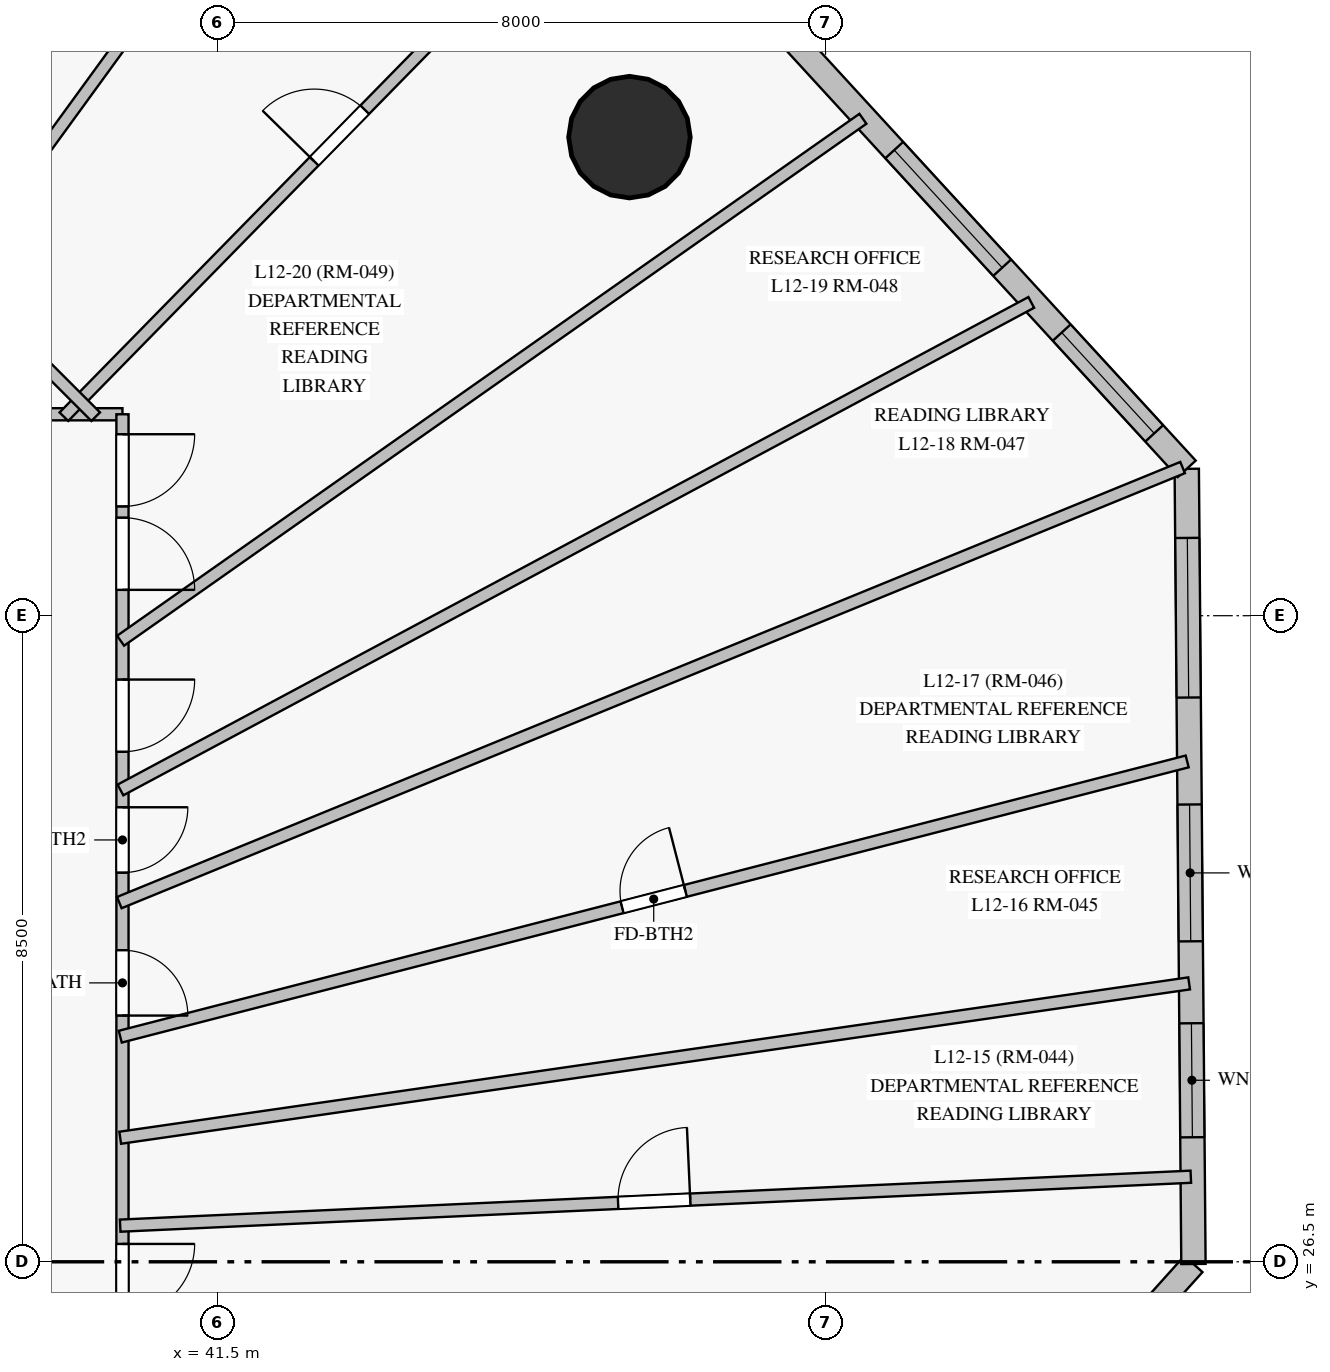
"""IFC4 building model, lengths in metres.
Left out: names, types, materials, properties, quantities, classifications, styles, units other than length and angle.
Written with IfcOpenShell. Run it as: python <this file> out.ifc"""

import sys

from ifc_helpers import new_model, si_unit, direction, frame, frame_2d, origin, origin_with_axes, origin_2d, place, context, subcontext, project, spatial, rectangle, circle, extrude, source, transform, mapped, element, fill, save


model = new_model("IFC4")
c1 = context("Model", 3, precision=1e-05, world=origin(), true_north=direction((0.0, 1.0)))
c2 = subcontext(c1, "Body", "Model", "MODEL_VIEW")
j1 = project(units=[si_unit("LENGTHUNIT", "METRE"), si_unit("PLANEANGLEUNIT", "RADIAN")], contexts=[c1])
p1 = place(None, origin())
s1 = spatial("IfcSite", under=j1, at=p1, CompositionType="ELEMENT")
p2 = place(p1, origin())
s2 = spatial("IfcBuilding", under=s1, at=p2, CompositionType="ELEMENT")
p3 = place(p2, frame((0.0, 0.0, 48.1)))
s3 = spatial("IfcBuildingStorey", under=s2, at=p3, CompositionType="ELEMENT", Elevation=48.1)
m1 = source(origin_with_axes(), c2, "Body", "SweptSolid", [
    extrude(circle(Radius=0.8, at=origin_2d()), origin(), (0.0, 0.0, 1.0), 3.6),
])
p4 = place(p3, frame((46.92, 41.296, 0.0), z_axis=(0.0, 0.0, 1.0), x_axis=(1.0, 0.0, 0.0)))
e1 = element("IfcColumn", 1, at=p4, inside=s3, PredefinedType="COLUMN", context=c2, shape_type="MappedRepresentation", body=[
    mapped(m1, transform((0.0, 0.0, 0.0), scale=1.0)),
])
p5 = place(p3, frame((43.846, 14.796, 0.0), z_axis=(0.0, 0.0, 1.0), x_axis=(0.668485145509, 0.743725493871, 0.0)))
e2 = element("IfcWall", 2, at=p5, inside=s3, PredefinedType="SOLIDWALL", context=c2, shape_type="SweptSolid", body=[
    extrude(rectangle(XDim=15.698, YDim=0.32, at=frame_2d((7.849, 0.0))), origin(), (0.0, 0.0, 1.0), 3.35),
])
p6 = place(p5, frame((2.419, 0.0, 0.85)))
e3 = element("IfcOpeningElement", 3, at=p6, cuts=e2, PredefinedType="OPENING", context=c2, shape_type="SweptSolid", body=[
    extrude(rectangle(XDim=2.1, YDim=1.95, at=frame_2d((1.05, 0.975))), frame((0.0, 0.17, 0.0), z_axis=(0.0, -1.0, 0.0), x_axis=(1.0, 0.0, 0.0)), (0.0, 0.0, 1.0), 0.34),
])
p7 = place(p5, frame((7.36, 0.0, 0.85)))
e4 = element("IfcOpeningElement", 4, at=p7, cuts=e2, PredefinedType="OPENING", context=c2, shape_type="SweptSolid", body=[
    extrude(rectangle(XDim=2.1, YDim=1.95, at=frame_2d((1.05, 0.975))), frame((0.0, 0.17, 0.0), z_axis=(0.0, -1.0, 0.0), x_axis=(1.0, 0.0, 0.0)), (0.0, 0.0, 1.0), 0.34),
])
p8 = place(p5, frame((12.369, 0.0, 0.85)))
e5 = element("IfcOpeningElement", 5, at=p8, cuts=e2, PredefinedType="OPENING", context=c2, shape_type="SweptSolid", body=[
    extrude(rectangle(XDim=2.1, YDim=1.95, at=frame_2d((1.05, 0.975))), frame((0.0, 0.17, 0.0), z_axis=(0.0, -1.0, 0.0), x_axis=(1.0, 0.0, 0.0)), (0.0, 0.0, 1.0), 0.34),
])
p9 = place(p3, frame((54.34, 26.471, 0.0), z_axis=(0.0, 0.0, 1.0), x_axis=(-0.008424635088, 0.999964512132, 0.0)))
e6 = element("IfcWall", 6, at=p9, inside=s3, PredefinedType="SOLIDWALL", context=c2, shape_type="SweptSolid", body=[
    extrude(rectangle(XDim=10.462, YDim=0.32, at=frame_2d((5.231, 0.0))), origin(), (0.0, 0.0, 1.0), 3.35),
])
p10 = place(p9, frame((1.667, 0.0, 0.85)))
e7 = element("IfcOpeningElement", 7, at=p10, cuts=e6, PredefinedType="OPENING", context=c2, shape_type="SweptSolid", body=[
    extrude(rectangle(XDim=1.5, YDim=1.85, at=frame_2d((0.75, 0.925))), frame((0.0, 0.17, 0.0), z_axis=(0.0, -1.0, 0.0), x_axis=(1.0, 0.0, 0.0)), (0.0, 0.0, 1.0), 0.34),
])
p11 = place(p9, frame((4.245, 0.0, 0.85)))
e8 = element("IfcOpeningElement", 8, at=p11, cuts=e6, PredefinedType="OPENING", context=c2, shape_type="SweptSolid", body=[
    extrude(rectangle(XDim=1.8, YDim=1.85, at=frame_2d((0.9, 0.925))), frame((0.0, 0.17, 0.0), z_axis=(0.0, -1.0, 0.0), x_axis=(1.0, 0.0, 0.0)), (0.0, 0.0, 1.0), 0.34),
])
p12 = place(p9, frame((7.452, 0.0, 0.85)))
e9 = element("IfcOpeningElement", 9, at=p12, cuts=e6, PredefinedType="OPENING", context=c2, shape_type="SweptSolid", body=[
    extrude(rectangle(XDim=2.1, YDim=1.95, at=frame_2d((1.05, 0.975))), frame((0.0, 0.17, 0.0), z_axis=(0.0, -1.0, 0.0), x_axis=(1.0, 0.0, 0.0)), (0.0, 0.0, 1.0), 0.34),
])
p13 = place(p3, frame((54.252, 36.932, 0.0), z_axis=(0.0, 0.0, 1.0), x_axis=(-0.676154884731, 0.736759507474, 0.0)))
e10 = element("IfcWall", 10, at=p13, inside=s3, PredefinedType="SOLIDWALL", context=c2, shape_type="SweptSolid", body=[
    extrude(rectangle(XDim=13.024, YDim=0.32, at=frame_2d((6.512, 0.0))), origin(), (0.0, 0.0, 1.0), 3.35),
])
p14 = place(p13, frame((0.633, 0.0, 0.85)))
e11 = element("IfcOpeningElement", 11, at=p14, cuts=e10, PredefinedType="OPENING", context=c2, shape_type="SweptSolid", body=[
    extrude(rectangle(XDim=1.8, YDim=1.85, at=frame_2d((0.9, 0.925))), frame((0.0, 0.17, 0.0), z_axis=(0.0, -1.0, 0.0), x_axis=(1.0, 0.0, 0.0)), (0.0, 0.0, 1.0), 0.34),
])
p15 = place(p13, frame((3.592, 0.0, 0.85)))
e12 = element("IfcOpeningElement", 12, at=p15, cuts=e10, PredefinedType="OPENING", context=c2, shape_type="SweptSolid", body=[
    extrude(rectangle(XDim=2.1, YDim=1.95, at=frame_2d((1.05, 0.975))), frame((0.0, 0.17, 0.0), z_axis=(0.0, -1.0, 0.0), x_axis=(1.0, 0.0, 0.0)), (0.0, 0.0, 1.0), 0.34),
])
p16 = place(p13, frame((7.611, 0.0, 0.85)))
e13 = element("IfcOpeningElement", 13, at=p16, cuts=e10, PredefinedType="OPENING", context=c2, shape_type="SweptSolid", body=[
    extrude(rectangle(XDim=2.1, YDim=1.95, at=frame_2d((1.05, 0.975))), frame((0.0, 0.17, 0.0), z_axis=(0.0, -1.0, 0.0), x_axis=(1.0, 0.0, 0.0)), (0.0, 0.0, 1.0), 0.34),
])
p17 = place(p3, frame((10.5, 37.65, 0.0), z_axis=(0.0, 0.0, 1.0), x_axis=(1.0, 0.0, 0.0)))
e14 = element("IfcWall", 14, at=p17, inside=s3, PredefinedType="PARTITIONING", context=c2, shape_type="SweptSolid", body=[
    extrude(rectangle(XDim=29.75, YDim=0.16, at=frame_2d((14.875, 0.0))), origin(), (0.0, 0.0, 1.0), 2.75),
])
p18 = place(p17, frame((21.927, 0.0, 0.0)))
e15 = element("IfcOpeningElement", 15, at=p18, cuts=e14, PredefinedType="OPENING", context=c2, shape_type="SweptSolid", body=[
    extrude(rectangle(XDim=0.95, YDim=2.15, at=frame_2d((0.475, 1.075))), frame((0.0, 0.09, 0.0), z_axis=(0.0, -1.0, 0.0), x_axis=(1.0, 0.0, 0.0)), (0.0, 0.0, 1.0), 0.18),
])
p19 = place(p17, frame((20.262, 0.0, 0.0)))
e16 = element("IfcOpeningElement", 16, at=p19, cuts=e14, PredefinedType="OPENING", context=c2, shape_type="SweptSolid", body=[
    extrude(rectangle(XDim=0.95, YDim=2.15, at=frame_2d((0.475, 1.075))), frame((0.0, 0.09, 0.0), z_axis=(0.0, -1.0, 0.0), x_axis=(1.0, 0.0, 0.0)), (0.0, 0.0, 1.0), 0.18),
])
p20 = place(p17, frame((18.722, 0.0, 0.0)))
e17 = element("IfcOpeningElement", 17, at=p20, cuts=e14, PredefinedType="OPENING", context=c2, shape_type="SweptSolid", body=[
    extrude(rectangle(XDim=0.95, YDim=2.15, at=frame_2d((0.475, 1.075))), frame((0.0, 0.09, 0.0), z_axis=(0.0, -1.0, 0.0), x_axis=(1.0, 0.0, 0.0)), (0.0, 0.0, 1.0), 0.18),
])
p21 = place(p17, frame((14.4, 0.0, 0.0)))
e18 = element("IfcOpeningElement", 18, at=p21, cuts=e14, PredefinedType="OPENING", context=c2, shape_type="SweptSolid", body=[
    extrude(rectangle(XDim=0.95, YDim=2.15, at=frame_2d((0.475, 1.075))), frame((0.0, 0.09, 0.0), z_axis=(0.0, -1.0, 0.0), x_axis=(1.0, 0.0, 0.0)), (0.0, 0.0, 1.0), 0.18),
])
p22 = place(p17, frame((6.962, 0.0, 0.0)))
e19 = element("IfcOpeningElement", 19, at=p22, cuts=e14, PredefinedType="OPENING", context=c2, shape_type="SweptSolid", body=[
    extrude(rectangle(XDim=0.95, YDim=2.15, at=frame_2d((0.475, 1.075))), frame((0.0, 0.09, 0.0), z_axis=(0.0, -1.0, 0.0), x_axis=(1.0, 0.0, 0.0)), (0.0, 0.0, 1.0), 0.18),
])
p23 = place(p3, frame((40.25, 37.65, 0.0), z_axis=(0.0, 0.0, 1.0), x_axis=(0.0, -1.0, 0.0)))
e20 = element("IfcWall", 20, at=p23, inside=s3, PredefinedType="PARTITIONING", context=c2, shape_type="SweptSolid", body=[
    extrude(rectangle(XDim=22.3, YDim=0.16, at=frame_2d((11.15, 0.0))), origin(), (0.0, 0.0, 1.0), 2.75),
])
p24 = place(p23, frame((14.02, 0.0, 0.0)))
e21 = element("IfcOpeningElement", 21, at=p24, cuts=e20, PredefinedType="OPENING", context=c2, shape_type="SweptSolid", body=[
    extrude(rectangle(XDim=0.95, YDim=2.15, at=frame_2d((0.475, 1.075))), frame((0.0, 0.09, 0.0), z_axis=(0.0, -1.0, 0.0), x_axis=(1.0, 0.0, 0.0)), (0.0, 0.0, 1.0), 0.18),
])
p25 = place(p23, frame((10.915, 0.0, 0.0)))
e22 = element("IfcOpeningElement", 22, at=p25, cuts=e20, PredefinedType="OPENING", context=c2, shape_type="SweptSolid", body=[
    extrude(rectangle(XDim=0.95, YDim=2.15, at=frame_2d((0.475, 1.075))), frame((0.0, 0.09, 0.0), z_axis=(0.0, -1.0, 0.0), x_axis=(1.0, 0.0, 0.0)), (0.0, 0.0, 1.0), 0.18),
])
p26 = place(p23, frame((7.051, 0.0, 0.0)))
e23 = element("IfcOpeningElement", 23, at=p26, cuts=e20, PredefinedType="OPENING", context=c2, shape_type="SweptSolid", body=[
    extrude(rectangle(XDim=0.86, YDim=2.1, at=frame_2d((0.43, 1.05))), frame((0.0, 0.09, 0.0), z_axis=(0.0, -1.0, 0.0), x_axis=(1.0, 0.0, 0.0)), (0.0, 0.0, 1.0), 0.18),
])
p27 = place(p23, frame((3.49, 0.0, 0.0)))
e24 = element("IfcOpeningElement", 24, at=p27, cuts=e20, PredefinedType="OPENING", context=c2, shape_type="SweptSolid", body=[
    extrude(rectangle(XDim=0.95, YDim=2.15, at=frame_2d((0.475, 1.075))), frame((0.0, 0.09, 0.0), z_axis=(0.0, -1.0, 0.0), x_axis=(1.0, 0.0, 0.0)), (0.0, 0.0, 1.0), 0.18),
])
p28 = place(p23, frame((1.36, 0.0, 0.0)))
e25 = element("IfcOpeningElement", 25, at=p28, cuts=e20, PredefinedType="OPENING", context=c2, shape_type="SweptSolid", body=[
    extrude(rectangle(XDim=0.95, YDim=2.15, at=frame_2d((0.475, 1.075))), frame((0.0, 0.09, 0.0), z_axis=(0.0, -1.0, 0.0), x_axis=(1.0, 0.0, 0.0)), (0.0, 0.0, 1.0), 0.18),
])
p29 = place(p23, frame((0.263, 0.0, 0.0)))
e26 = element("IfcOpeningElement", 26, at=p29, cuts=e20, PredefinedType="OPENING", context=c2, shape_type="SweptSolid", body=[
    extrude(rectangle(XDim=0.95, YDim=2.15, at=frame_2d((0.475, 1.075))), frame((0.0, 0.09, 0.0), z_axis=(0.0, -1.0, 0.0), x_axis=(1.0, 0.0, 0.0)), (0.0, 0.0, 1.0), 0.18),
])
p30 = place(p23, frame((15.155, 0.0, 0.0)))
e27 = element("IfcOpeningElement", 27, at=p30, cuts=e20, PredefinedType="OPENING", context=c2, shape_type="SweptSolid", body=[
    extrude(rectangle(XDim=0.95, YDim=2.15, at=frame_2d((0.475, 1.075))), frame((0.0, 0.09, 0.0), z_axis=(0.0, -1.0, 0.0), x_axis=(1.0, 0.0, 0.0)), (0.0, 0.0, 1.0), 0.18),
])
p31 = place(p23, frame((5.17, 0.0, 0.0)))
e28 = element("IfcOpeningElement", 28, at=p31, cuts=e20, PredefinedType="OPENING", context=c2, shape_type="SweptSolid", body=[
    extrude(rectangle(XDim=0.86, YDim=2.04, at=frame_2d((0.43, 1.02))), frame((0.0, 0.09, 0.0), z_axis=(0.0, -1.0, 0.0), x_axis=(1.0, 0.0, 0.0)), (0.0, 0.0, 1.0), 0.18),
])
p32 = place(p3, frame((40.208, 31.226, 0.0), z_axis=(0.0, 0.0, 1.0), x_axis=(0.925535120156, 0.378661776995, 0.0)))
e29 = element("IfcWall", 29, at=p32, inside=s3, PredefinedType="PARTITIONING", context=c2, shape_type="SweptSolid", body=[
    extrude(rectangle(XDim=15.115, YDim=0.16, at=frame_2d((7.557, 0.0))), origin(), (0.0, 0.0, 1.0), 3.35),
])
p33 = place(p3, frame((40.221, 29.462, 0.0), z_axis=(0.0, 0.0, 1.0), x_axis=(0.968302425426, 0.249780729667, 0.0)))
e30 = element("IfcWall", 30, at=p33, inside=s3, PredefinedType="PARTITIONING", context=c2, shape_type="SweptSolid", body=[
    extrude(rectangle(XDim=14.496, YDim=0.16, at=frame_2d((7.248, 0.0))), origin(), (0.0, 0.0, 1.0), 3.35),
])
p34 = place(p33, frame((6.818, 0.0, 0.0)))
e31 = element("IfcOpeningElement", 31, at=p34, cuts=e30, PredefinedType="OPENING", context=c2, shape_type="SweptSolid", body=[
    extrude(rectangle(XDim=0.86, YDim=2.04, at=frame_2d((0.43, 1.02))), frame((0.0, 0.09, 0.0), z_axis=(0.0, -1.0, 0.0), x_axis=(1.0, 0.0, 0.0)), (0.0, 0.0, 1.0), 0.18),
])
p35 = place(p3, frame((40.22, 28.132, 0.0), z_axis=(0.0, 0.0, 1.0), x_axis=(0.989733920752, 0.142922237992, 0.0)))
e32 = element("IfcWall", 32, at=p35, inside=s3, PredefinedType="PARTITIONING", context=c2, shape_type="SweptSolid", body=[
    extrude(rectangle(XDim=14.209, YDim=0.16, at=frame_2d((7.104, 0.0))), origin(), (0.0, 0.0, 1.0), 3.35),
])
p36 = place(p3, frame((40.22, 26.976, 0.0), z_axis=(0.0, 0.0, 1.0), x_axis=(0.998957874031, 0.045641712413, 0.0)))
e33 = element("IfcWall", 33, at=p36, inside=s3, PredefinedType="PARTITIONING", context=c2, shape_type="SweptSolid", body=[
    extrude(rectangle(XDim=14.1, YDim=0.16, at=frame_2d((7.05, 0.0))), origin(), (0.0, 0.0, 1.0), 3.35),
])
p37 = place(p36, frame((6.558, 0.0, 0.0)))
e34 = element("IfcOpeningElement", 34, at=p37, cuts=e33, PredefinedType="OPENING", context=c2, shape_type="SweptSolid", body=[
    extrude(rectangle(XDim=0.95, YDim=2.15, at=frame_2d((0.475, 1.075))), frame((0.0, 0.09, 0.0), z_axis=(0.0, -1.0, 0.0), x_axis=(1.0, 0.0, 0.0)), (0.0, 0.0, 1.0), 0.18),
])
p38 = place(p3, frame((40.224, 32.708, 0.0), z_axis=(0.0, 0.0, 1.0), x_axis=(0.881639877006, 0.471922798001, 0.0)))
e35 = element("IfcWall", 35, at=p38, inside=s3, PredefinedType="PARTITIONING", context=c2, shape_type="SweptSolid", body=[
    extrude(rectangle(XDim=13.591, YDim=0.16, at=frame_2d((6.796, 0.0))), origin(), (0.0, 0.0, 1.0), 3.35),
])
p39 = place(p3, frame((40.226, 34.671, 0.0), z_axis=(0.0, 0.0, 1.0), x_axis=(0.818038780685, 0.5751630667, 0.0)))
e36 = element("IfcWall", 36, at=p39, inside=s3, PredefinedType="PARTITIONING", context=c2, shape_type="SweptSolid", body=[
    extrude(rectangle(XDim=11.938, YDim=0.16, at=frame_2d((5.969, 0.0))), origin(), (0.0, 0.0, 1.0), 3.35),
])
p40 = place(p3, frame((39.479, 37.618, 0.0), z_axis=(0.0, 0.0, 1.0), x_axis=(0.699941263182, 0.714200411716, 0.0)))
e37 = element("IfcWall", 37, at=p40, inside=s3, PredefinedType="PARTITIONING", context=c2, shape_type="SweptSolid", body=[
    extrude(rectangle(XDim=10.41, YDim=0.16, at=frame_2d((5.205, 0.0))), origin(), (0.0, 0.0, 1.0), 3.35),
])
p41 = place(p40, frame((4.705, 0.0, 0.0)))
e38 = element("IfcOpeningElement", 38, at=p41, cuts=e37, PredefinedType="OPENING", context=c2, shape_type="SweptSolid", body=[
    extrude(rectangle(XDim=0.95, YDim=2.15, at=frame_2d((0.475, 1.075))), frame((0.0, 0.09, 0.0), z_axis=(0.0, -1.0, 0.0), x_axis=(1.0, 0.0, 0.0)), (0.0, 0.0, 1.0), 0.18),
])
p42 = place(p3, frame((38.026, 39.49, 0.0), z_axis=(0.0, 0.0, 1.0), x_axis=(0.588344255405, 0.808610559622, 0.0)))
e39 = element("IfcWall", 39, at=p42, inside=s3, PredefinedType="PARTITIONING", context=c2, shape_type="SweptSolid", body=[
    extrude(rectangle(XDim=9.421, YDim=0.16, at=frame_2d((4.711, 0.0))), origin(), (0.0, 0.0, 1.0), 3.35),
])
p43 = place(p42, frame((4.281, 0.0, 0.0)))
e40 = element("IfcOpeningElement", 40, at=p43, cuts=e39, PredefinedType="OPENING", context=c2, shape_type="SweptSolid", body=[
    extrude(rectangle(XDim=0.86, YDim=2.04, at=frame_2d((0.43, 1.02))), frame((0.0, 0.09, 0.0), z_axis=(0.0, -1.0, 0.0), x_axis=(1.0, 0.0, 0.0)), (0.0, 0.0, 1.0), 0.18),
])
p44 = place(p3, frame((39.898, 37.618, 0.0), z_axis=(0.0, 0.0, 1.0), x_axis=(-0.707106781187, 0.707106781187, 0.0)))
e41 = element("IfcWall", 41, at=p44, inside=s3, PredefinedType="PARTITIONING", context=c2, shape_type="SweptSolid", body=[
    extrude(rectangle(XDim=2.647, YDim=0.16, at=frame_2d((1.324, 0.0))), origin(), (0.0, 0.0, 1.0), 2.75),
])
m2 = source(origin_with_axes(), c2, "Body", "SweptSolid", [
    extrude(rectangle(XDim=1.5, YDim=1.85, at=frame_2d((0.75, 0.925))), frame((0.0, 0.03, 0.0), z_axis=(0.0, -1.0, 0.0), x_axis=(1.0, 0.0, 0.0)), (0.0, 0.0, 1.0), 0.06),
])
p45 = place(p10, origin())
e42 = element("IfcWindow", 42, at=p45, inside=s3, PartitioningType="SINGLE_PANEL", PredefinedType="WINDOW", context=c2, shape_type="MappedRepresentation", body=[
    mapped(m2, transform((0.0, 0.0, 0.0), scale=1.0)),
])
fill(e7, e42)
m3 = source(origin_with_axes(), c2, "Body", "SweptSolid", [
    extrude(rectangle(XDim=1.8, YDim=1.85, at=frame_2d((0.9, 0.925))), frame((0.0, 0.03, 0.0), z_axis=(0.0, -1.0, 0.0), x_axis=(1.0, 0.0, 0.0)), (0.0, 0.0, 1.0), 0.06),
])
p46 = place(p11, origin())
e43 = element("IfcWindow", 43, at=p46, inside=s3, PartitioningType="SINGLE_PANEL", PredefinedType="WINDOW", context=c2, shape_type="MappedRepresentation", body=[
    mapped(m3, transform((0.0, 0.0, 0.0), scale=1.0)),
])
fill(e8, e43)
m4 = source(origin_with_axes(), c2, "Body", "SweptSolid", [
    extrude(rectangle(XDim=2.1, YDim=1.95, at=frame_2d((1.05, 0.975))), frame((0.0, 0.03, 0.0), z_axis=(0.0, -1.0, 0.0), x_axis=(1.0, 0.0, 0.0)), (0.0, 0.0, 1.0), 0.06),
])
p47 = place(p12, origin())
e44 = element("IfcWindow", 44, at=p47, inside=s3, PartitioningType="SINGLE_PANEL", PredefinedType="WINDOW", context=c2, shape_type="MappedRepresentation", body=[
    mapped(m4, transform((0.0, 0.0, 0.0), scale=1.0)),
])
fill(e9, e44)
p48 = place(p14, origin())
e45 = element("IfcWindow", 45, at=p48, inside=s3, PartitioningType="SINGLE_PANEL", PredefinedType="WINDOW", context=c2, shape_type="MappedRepresentation", body=[
    mapped(m3, transform((0.0, 0.0, 0.0), scale=1.0)),
])
fill(e11, e45)
p49 = place(p15, origin())
e46 = element("IfcWindow", 46, at=p49, inside=s3, PartitioningType="SINGLE_PANEL", PredefinedType="WINDOW", context=c2, shape_type="MappedRepresentation", body=[
    mapped(m4, transform((0.0, 0.0, 0.0), scale=1.0)),
])
fill(e12, e46)
m5 = source(origin_with_axes(), c2, "Body", "SweptSolid", [
    extrude(rectangle(XDim=0.95, YDim=2.15, at=frame_2d((0.475, 1.075))), frame((0.0, 0.025, 0.0), z_axis=(0.0, -1.0, 0.0), x_axis=(1.0, 0.0, 0.0)), (0.0, 0.0, 1.0), 0.05),
])
p50 = place(p25, origin())
e47 = element("IfcDoor", 47, at=p50, inside=s3, OperationType="SINGLE_SWING_LEFT", PredefinedType="DOOR", context=c2, shape_type="MappedRepresentation", body=[
    mapped(m5, transform((0.0, 0.0, 0.0), scale=1.0)),
])
fill(e22, e47)
m6 = source(origin_with_axes(), c2, "Body", "SweptSolid", [
    extrude(rectangle(XDim=0.86, YDim=2.1, at=frame_2d((0.43, 1.05))), frame((0.0, 0.025, 0.0), z_axis=(0.0, -1.0, 0.0), x_axis=(1.0, 0.0, 0.0)), (0.0, 0.0, 1.0), 0.05),
])
p51 = place(p26, origin())
e48 = element("IfcDoor", 48, at=p51, inside=s3, OperationType="SINGLE_SWING_RIGHT", PredefinedType="DOOR", context=c2, shape_type="MappedRepresentation", body=[
    mapped(m6, transform((0.0, 0.0, 0.0), scale=1.0)),
])
fill(e23, e48)
p52 = place(p27, origin())
e49 = element("IfcDoor", 49, at=p52, inside=s3, OperationType="SINGLE_SWING_LEFT", PredefinedType="DOOR", context=c2, shape_type="MappedRepresentation", body=[
    mapped(m5, transform((0.0, 0.0, 0.0), scale=1.0)),
])
fill(e24, e49)
p53 = place(p28, origin())
e50 = element("IfcDoor", 50, at=p53, inside=s3, OperationType="SINGLE_SWING_RIGHT", PredefinedType="DOOR", context=c2, shape_type="MappedRepresentation", body=[
    mapped(m5, transform((0.0, 0.0, 0.0), scale=1.0)),
])
fill(e25, e50)
p54 = place(p29, origin())
e51 = element("IfcDoor", 51, at=p54, inside=s3, OperationType="SINGLE_SWING_LEFT", PredefinedType="DOOR", context=c2, shape_type="MappedRepresentation", body=[
    mapped(m5, transform((0.0, 0.0, 0.0), scale=1.0)),
])
fill(e26, e51)
p55 = place(p37, origin())
e52 = element("IfcDoor", 52, at=p55, inside=s3, OperationType="SINGLE_SWING_RIGHT", PredefinedType="DOOR", context=c2, shape_type="MappedRepresentation", body=[
    mapped(m5, transform((0.0, 0.0, 0.0), scale=1.0)),
])
fill(e34, e52)
p56 = place(p41, origin())
e53 = element("IfcDoor", 53, at=p56, inside=s3, OperationType="SINGLE_SWING_LEFT", PredefinedType="DOOR", context=c2, shape_type="MappedRepresentation", body=[
    mapped(m5, transform((0.0, 0.0, 0.0), scale=1.0)),
])
fill(e38, e53)
m7 = source(origin_with_axes(), c2, "Body", "SweptSolid", [
    extrude(rectangle(XDim=0.86, YDim=2.04, at=frame_2d((0.43, 1.02))), frame((0.0, 0.025, 0.0), z_axis=(0.0, -1.0, 0.0), x_axis=(1.0, 0.0, 0.0)), (0.0, 0.0, 1.0), 0.05),
])
p57 = place(p34, origin())
e54 = element("IfcDoor", 54, at=p57, inside=s3, OperationType="SINGLE_SWING_RIGHT", PredefinedType="DOOR", context=c2, shape_type="MappedRepresentation", body=[
    mapped(m7, transform((0.0, 0.0, 0.0), scale=1.0)),
])
fill(e31, e54)
p58 = place(p31, origin())
e55 = element("IfcDoor", 55, at=p58, inside=s3, OperationType="SINGLE_SWING_LEFT", PredefinedType="DOOR", context=c2, shape_type="MappedRepresentation", body=[
    mapped(m7, transform((0.0, 0.0, 0.0), scale=1.0)),
])
fill(e28, e55)
save(model, sys.argv[1])
